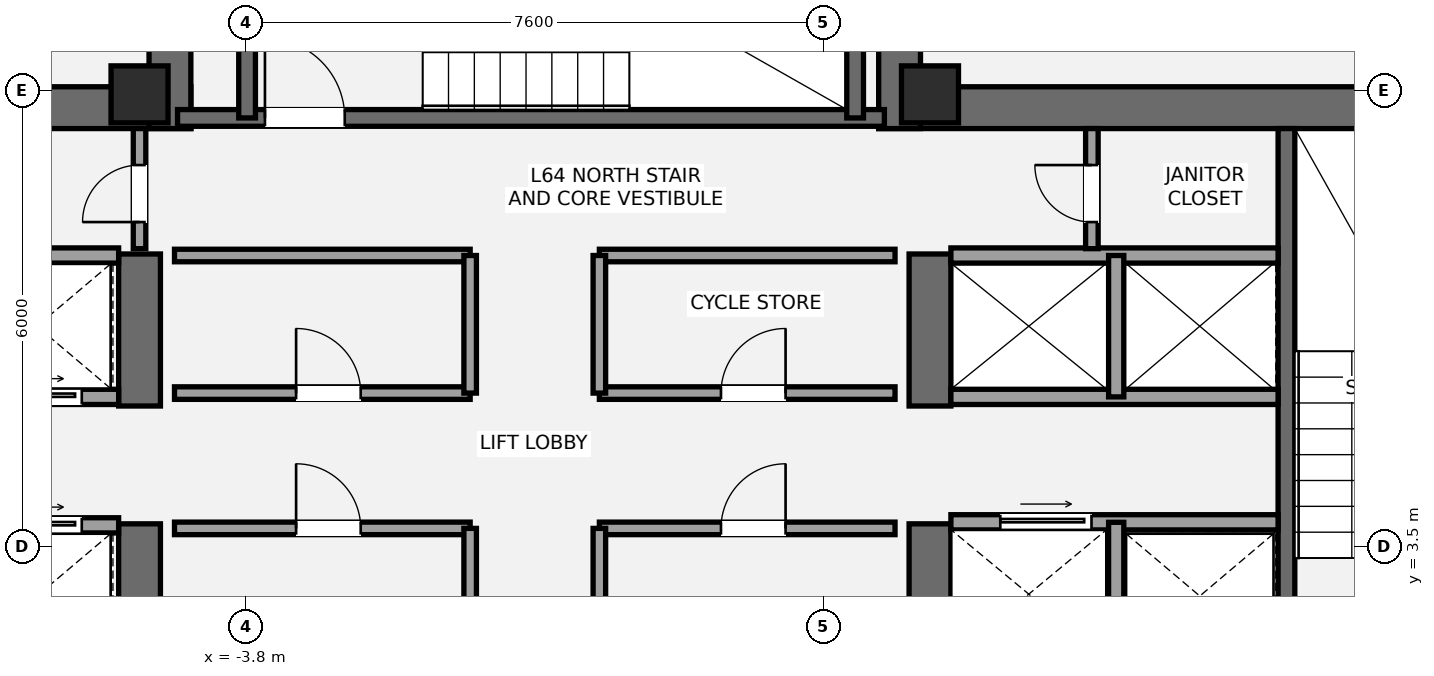
"""IFC4 building model, lengths in metres.
Left out: names, types, materials, properties, quantities, classifications, styles, units other than length and angle.
Written with IfcOpenShell. Run it as: python <this file> out.ifc"""

import sys

from ifc_helpers import new_model, si_unit, direction, frame, frame_2d, origin, origin_2d, place, context, subcontext, project, spatial, rectangle, extrude, element, fill, save


model = new_model("IFC4")
c1 = context("Model", 3, precision=1e-05, world=origin(), true_north=direction((0.0, 1.0)))
c2 = subcontext(c1, "Body", "Model", "MODEL_VIEW")
j1 = project(units=[si_unit("LENGTHUNIT", "METRE"), si_unit("PLANEANGLEUNIT", "RADIAN")], contexts=[c1])
p1 = place(None, origin())
s1 = spatial("IfcSite", under=j1, at=p1, CompositionType="ELEMENT")
p2 = place(p1, origin())
s2 = spatial("IfcBuilding", under=s1, at=p2, CompositionType="ELEMENT")
p3 = place(p2, frame((0.0, 0.0, 228.9)))
s3 = spatial("IfcBuildingStorey", under=s2, at=p3, CompositionType="ELEMENT", Elevation=228.9)
p4 = place(p3, frame((-13.7, 9.275, 0.0), z_axis=(0.0, 0.0, 1.0), x_axis=(1.0, 0.0, 0.0)))
e1 = element("IfcWall", 1, at=p4, inside=s3, PredefinedType="SHEAR", context=c2, shape_type="SweptSolid", body=[
    extrude(rectangle(XDim=9.175, YDim=0.55, at=frame_2d((4.587, 0.0))), origin(), (0.0, 0.0, 1.0), 3.15),
])
p5 = place(p3, frame((-5.2, 1.3, 0.0), z_axis=(0.0, 0.0, 1.0), x_axis=(0.0, 1.0, 0.0)))
e2 = element("IfcWall", 2, at=p5, inside=s3, PredefinedType="SHEAR", context=c2, shape_type="SweptSolid", body=[
    extrude(rectangle(XDim=2.5, YDim=0.55, at=frame_2d((1.25, 0.0))), origin(), (0.0, 0.0, 1.0), 3.15),
])
p6 = place(p3, frame((-5.2, 5.35, 0.0), z_axis=(0.0, 0.0, 1.0), x_axis=(0.0, 1.0, 0.0)))
e3 = element("IfcWall", 3, at=p6, inside=s3, PredefinedType="SHEAR", context=c2, shape_type="SweptSolid", body=[
    extrude(rectangle(XDim=2.0, YDim=0.55, at=frame_2d((1.0, 0.0))), origin(), (0.0, 0.0, 1.0), 3.15),
])
p7 = place(p3, frame((4.525, 9.275, 0.0), z_axis=(0.0, 0.0, 1.0), x_axis=(1.0, 0.0, 0.0)))
e4 = element("IfcWall", 4, at=p7, inside=s3, PredefinedType="SHEAR", context=c2, shape_type="SweptSolid", body=[
    extrude(rectangle(XDim=9.175, YDim=0.55, at=frame_2d((4.587, 0.0))), origin(), (0.0, 0.0, 1.0), 3.15),
])
p8 = place(p3, frame((5.2, 1.3, 0.0), z_axis=(0.0, 0.0, 1.0), x_axis=(0.0, 1.0, 0.0)))
e5 = element("IfcWall", 5, at=p8, inside=s3, PredefinedType="SHEAR", context=c2, shape_type="SweptSolid", body=[
    extrude(rectangle(XDim=2.5, YDim=0.55, at=frame_2d((1.25, 0.0))), origin(), (0.0, 0.0, 1.0), 3.15),
])
p9 = place(p3, frame((5.2, 5.35, 0.0), z_axis=(0.0, 0.0, 1.0), x_axis=(0.0, 1.0, 0.0)))
e6 = element("IfcWall", 6, at=p9, inside=s3, PredefinedType="SHEAR", context=c2, shape_type="SweptSolid", body=[
    extrude(rectangle(XDim=2.0, YDim=0.55, at=frame_2d((1.0, 0.0))), origin(), (0.0, 0.0, 1.0), 3.15),
])
p10 = place(p3, frame((9.89, 1.85, 0.0), z_axis=(0.0, 0.0, 1.0), x_axis=(0.0, 1.0, 0.0)))
e7 = element("IfcWall", 7, at=p10, inside=s3, PredefinedType="SHEAR", context=c2, shape_type="SweptSolid", body=[
    extrude(rectangle(XDim=7.15, YDim=0.22, at=frame_2d((3.575, 0.0))), origin(), (0.0, 0.0, 1.0), 3.15),
])
for number, where, z_axis, x_axis in (
    (8, (-4.8, 9.0, 0.0), (0.0, 0.0, 1.0), (0.0, 1.0, 0.0)),
    (9, (4.8, 9.0, 0.0), (0.0, 0.0, 1.0), (0.0, 1.0, 0.0)),
):
    element("IfcWall", number, at=place(p3, frame(where, z_axis=z_axis, x_axis=x_axis)), inside=s3, PredefinedType="SHEAR", context=c2, shape_type="SweptSolid", body=[
        extrude(rectangle(XDim=3.95, YDim=0.55, at=frame_2d((1.975, 0.0))), origin(), (0.0, 0.0, 1.0), 3.15),
    ])
p11 = place(p3, frame((-4.7, 9.14, 0.0), z_axis=(0.0, 0.0, 1.0), x_axis=(1.0, 0.0, 0.0)))
e10 = element("IfcWall", 10, at=p11, inside=s3, PredefinedType="SHEAR", context=c2, shape_type="SweptSolid", body=[
    extrude(rectangle(XDim=9.3, YDim=0.22, at=frame_2d((4.65, 0.0))), origin(), (0.0, 0.0, 1.0), 3.15),
])
p12 = place(p11, frame((1.15, 0.0, 0.0)))
e11 = element("IfcOpeningElement", 11, at=p12, cuts=e10, PredefinedType="OPENING", context=c2, shape_type="SweptSolid", body=[
    extrude(rectangle(XDim=1.05, YDim=2.15, at=frame_2d((0.525, 1.075))), frame((0.0, 0.12, 0.0), z_axis=(0.0, -1.0, 0.0), x_axis=(1.0, 0.0, 0.0)), (0.0, 0.0, 1.0), 0.24),
])
for number, where, z_axis, x_axis in (
    (12, (-3.785, 9.14, 0.0), (0.0, 0.0, 1.0), (0.0, 1.0, 0.0)),
    (13, (4.215, 9.14, 0.0), (0.0, 0.0, 1.0), (0.0, 1.0, 0.0)),
):
    element("IfcWall", number, at=place(p3, frame(where, z_axis=z_axis, x_axis=x_axis)), inside=s3, PredefinedType="SHEAR", context=c2, shape_type="SweptSolid", body=[
        extrude(rectangle(XDim=3.26, YDim=0.22, at=frame_2d((1.63, 0.0))), origin(), (0.0, 0.0, 1.0), 3.15),
    ])
for number, where, z_axis, x_axis in (
    (14, (-5.2, 9.45, 0.0), (0.0, 0.0, 1.0), (1.0, 0.0, 0.0)),
    (15, (5.2, 9.45, 0.0), (0.0, 0.0, 1.0), (1.0, 0.0, 0.0)),
):
    element("IfcColumn", number, at=place(p3, frame(where, z_axis=z_axis, x_axis=x_axis)), inside=s3, PredefinedType="PILASTER", context=c2, shape_type="SweptSolid", body=[
        extrude(rectangle(XDim=0.75, YDim=0.75, at=origin_2d()), origin(), (0.0, 0.0, 1.0), 3.15),
    ])
p13 = place(p3, frame((-9.78, 3.78, 0.0), z_axis=(0.0, 0.0, 1.0), x_axis=(1.0, 0.0, 0.0)))
e16 = element("IfcWall", 16, at=p13, inside=s3, PredefinedType="SOLIDWALL", context=c2, shape_type="SweptSolid", body=[
    extrude(rectangle(XDim=4.305, YDim=0.2, at=frame_2d((2.152, 0.0))), origin(), (0.0, 0.0, 1.0), 2.97),
])
p14 = place(p13, frame((2.72, 0.0, 0.0)))
e17 = element("IfcOpeningElement", 17, at=p14, cuts=e16, PredefinedType="OPENING", context=c2, shape_type="SweptSolid", body=[
    extrude(rectangle(XDim=1.1, YDim=2.2, at=frame_2d((0.55, 1.1))), frame((0.0, 0.11, 0.0), z_axis=(0.0, -1.0, 0.0), x_axis=(1.0, 0.0, 0.0)), (0.0, 0.0, 1.0), 0.22),
])
p15 = place(p3, frame((-9.78, 5.47, 0.0), z_axis=(0.0, 0.0, 1.0), x_axis=(1.0, 0.0, 0.0)))
e18 = element("IfcWall", 18, at=p15, inside=s3, PredefinedType="SOLIDWALL", context=c2, shape_type="SweptSolid", body=[
    extrude(rectangle(XDim=4.305, YDim=0.2, at=frame_2d((2.152, 0.0))), origin(), (0.0, 0.0, 1.0), 2.97),
])
p16 = place(p15, frame((0.55, 0.0, 0.0)))
e19 = element("IfcOpeningElement", 19, at=p16, cuts=e18, PredefinedType="OPENING", context=c2, shape_type="SweptSolid", body=[
    extrude(rectangle(XDim=1.1, YDim=2.2, at=frame_2d((0.55, 1.1))), frame((0.0, 0.11, 0.0), z_axis=(0.0, -1.0, 0.0), x_axis=(1.0, 0.0, 0.0)), (0.0, 0.0, 1.0), 0.22),
])
p17 = place(p15, frame((2.72, 0.0, 0.0)))
e20 = element("IfcOpeningElement", 20, at=p17, cuts=e18, PredefinedType="OPENING", context=c2, shape_type="SweptSolid", body=[
    extrude(rectangle(XDim=1.1, YDim=2.2, at=frame_2d((0.55, 1.1))), frame((0.0, 0.11, 0.0), z_axis=(0.0, -1.0, 0.0), x_axis=(1.0, 0.0, 0.0)), (0.0, 0.0, 1.0), 0.22),
])
p18 = place(p3, frame((-9.78, 7.33, 0.0), z_axis=(0.0, 0.0, 1.0), x_axis=(1.0, 0.0, 0.0)))
e21 = element("IfcWall", 21, at=p18, inside=s3, PredefinedType="SOLIDWALL", context=c2, shape_type="SweptSolid", body=[
    extrude(rectangle(XDim=4.305, YDim=0.2, at=frame_2d((2.152, 0.0))), origin(), (0.0, 0.0, 1.0), 2.97),
])
p19 = place(p3, frame((5.475, 3.82, 0.0), z_axis=(0.0, 0.0, 1.0), x_axis=(1.0, 0.0, 0.0)))
e22 = element("IfcWall", 22, at=p19, inside=s3, PredefinedType="SOLIDWALL", context=c2, shape_type="SweptSolid", body=[
    extrude(rectangle(XDim=4.305, YDim=0.2, at=frame_2d((2.152, 0.0))), origin(), (0.0, 0.0, 1.0), 2.97),
])
p20 = place(p19, frame((0.65, 0.0, 0.0)))
e23 = element("IfcOpeningElement", 23, at=p20, cuts=e22, PredefinedType="OPENING", context=c2, shape_type="SweptSolid", body=[
    extrude(rectangle(XDim=1.2, YDim=2.2, at=frame_2d((0.6, 1.1))), frame((0.0, 0.11, 0.0), z_axis=(0.0, -1.0, 0.0), x_axis=(1.0, 0.0, 0.0)), (0.0, 0.0, 1.0), 0.22),
])
p21 = place(p3, frame((7.65, 1.85, 0.0), z_axis=(0.0, 0.0, 1.0), x_axis=(0.0, 1.0, 0.0)))
e24 = element("IfcWall", 24, at=p21, inside=s3, PredefinedType="SOLIDWALL", context=c2, shape_type="SweptSolid", body=[
    extrude(rectangle(XDim=1.97, YDim=0.2, at=frame_2d((0.985, 0.0))), origin(), (0.0, 0.0, 1.0), 2.97),
])
for number, where, z_axis, x_axis in (
    (25, (5.475, 5.47, 0.0), (0.0, 0.0, 1.0), (1.0, 0.0, 0.0)),
    (26, (5.475, 7.33, 0.0), (0.0, 0.0, 1.0), (1.0, 0.0, 0.0)),
):
    element("IfcWall", number, at=place(p3, frame(where, z_axis=z_axis, x_axis=x_axis)), inside=s3, PredefinedType="SOLIDWALL", context=c2, shape_type="SweptSolid", body=[
        extrude(rectangle(XDim=4.305, YDim=0.2, at=frame_2d((2.152, 0.0))), origin(), (0.0, 0.0, 1.0), 2.97),
    ])
p22 = place(p3, frame((7.65, 5.47, 0.0), z_axis=(0.0, 0.0, 1.0), x_axis=(0.0, 1.0, 0.0)))
e27 = element("IfcWall", 27, at=p22, inside=s3, PredefinedType="SOLIDWALL", context=c2, shape_type="SweptSolid", body=[
    extrude(rectangle(XDim=1.86, YDim=0.2, at=frame_2d((0.93, 0.0))), origin(), (0.0, 0.0, 1.0), 2.97),
])
p23 = place(p3, frame((-4.74, 3.74, 0.0), z_axis=(0.0, 0.0, 1.0), x_axis=(1.0, 0.0, 0.0)))
e28 = element("IfcWall", 28, at=p23, inside=s3, PredefinedType="PARTITIONING", context=c2, shape_type="SweptSolid", body=[
    extrude(rectangle(XDim=3.89, YDim=0.165, at=frame_2d((1.945, 0.0))), origin(), (0.0, 0.0, 1.0), 2.97),
])
p24 = place(p23, frame((1.6, 0.0, 0.0)))
e29 = element("IfcOpeningElement", 29, at=p24, cuts=e28, PredefinedType="OPENING", context=c2, shape_type="SweptSolid", body=[
    extrude(rectangle(XDim=0.85, YDim=2.1, at=frame_2d((0.425, 1.05))), frame((0.0, 0.093, 0.0), z_axis=(0.0, -1.0, 0.0), x_axis=(1.0, 0.0, 0.0)), (0.0, 0.0, 1.0), 0.185),
])
p25 = place(p3, frame((-0.85, 1.92, 0.0), z_axis=(0.0, 0.0, 1.0), x_axis=(0.0, 1.0, 0.0)))
e30 = element("IfcWall", 30, at=p25, inside=s3, PredefinedType="PARTITIONING", context=c2, shape_type="SweptSolid", body=[
    extrude(rectangle(XDim=1.82, YDim=0.165, at=frame_2d((0.91, 0.0))), origin(), (0.0, 0.0, 1.0), 2.97),
])
p26 = place(p3, frame((0.85, 3.74, 0.0), z_axis=(0.0, 0.0, 1.0), x_axis=(1.0, 0.0, 0.0)))
e31 = element("IfcWall", 31, at=p26, inside=s3, PredefinedType="PARTITIONING", context=c2, shape_type="SweptSolid", body=[
    extrude(rectangle(XDim=3.89, YDim=0.165, at=frame_2d((1.945, 0.0))), origin(), (0.0, 0.0, 1.0), 2.97),
])
p27 = place(p26, frame((1.6, 0.0, 0.0)))
e32 = element("IfcOpeningElement", 32, at=p27, cuts=e31, PredefinedType="OPENING", context=c2, shape_type="SweptSolid", body=[
    extrude(rectangle(XDim=0.85, YDim=2.1, at=frame_2d((0.425, 1.05))), frame((0.0, 0.093, 0.0), z_axis=(0.0, -1.0, 0.0), x_axis=(1.0, 0.0, 0.0)), (0.0, 0.0, 1.0), 0.185),
])
p28 = place(p3, frame((0.85, 1.92, 0.0), z_axis=(0.0, 0.0, 1.0), x_axis=(0.0, 1.0, 0.0)))
e33 = element("IfcWall", 33, at=p28, inside=s3, PredefinedType="PARTITIONING", context=c2, shape_type="SweptSolid", body=[
    extrude(rectangle(XDim=1.82, YDim=0.165, at=frame_2d((0.91, 0.0))), origin(), (0.0, 0.0, 1.0), 2.97),
])
p29 = place(p3, frame((-4.74, 5.52, 0.0), z_axis=(0.0, 0.0, 1.0), x_axis=(1.0, 0.0, 0.0)))
e34 = element("IfcWall", 34, at=p29, inside=s3, PredefinedType="PARTITIONING", context=c2, shape_type="SweptSolid", body=[
    extrude(rectangle(XDim=3.89, YDim=0.165, at=frame_2d((1.945, 0.0))), origin(), (0.0, 0.0, 1.0), 2.97),
])
p30 = place(p29, frame((1.6, 0.0, 0.0)))
e35 = element("IfcOpeningElement", 35, at=p30, cuts=e34, PredefinedType="OPENING", context=c2, shape_type="SweptSolid", body=[
    extrude(rectangle(XDim=0.85, YDim=2.1, at=frame_2d((0.425, 1.05))), frame((0.0, 0.093, 0.0), z_axis=(0.0, -1.0, 0.0), x_axis=(1.0, 0.0, 0.0)), (0.0, 0.0, 1.0), 0.185),
])
p31 = place(p3, frame((-4.74, 7.33, 0.0), z_axis=(0.0, 0.0, 1.0), x_axis=(1.0, 0.0, 0.0)))
e36 = element("IfcWall", 36, at=p31, inside=s3, PredefinedType="PARTITIONING", context=c2, shape_type="SweptSolid", body=[
    extrude(rectangle(XDim=3.89, YDim=0.165, at=frame_2d((1.945, 0.0))), origin(), (0.0, 0.0, 1.0), 2.97),
])
p32 = place(p3, frame((-0.85, 5.52, 0.0), z_axis=(0.0, 0.0, 1.0), x_axis=(0.0, 1.0, 0.0)))
e37 = element("IfcWall", 37, at=p32, inside=s3, PredefinedType="PARTITIONING", context=c2, shape_type="SweptSolid", body=[
    extrude(rectangle(XDim=1.81, YDim=0.165, at=frame_2d((0.905, 0.0))), origin(), (0.0, 0.0, 1.0), 2.97),
])
p33 = place(p3, frame((0.85, 5.52, 0.0), z_axis=(0.0, 0.0, 1.0), x_axis=(1.0, 0.0, 0.0)))
e38 = element("IfcWall", 38, at=p33, inside=s3, PredefinedType="PARTITIONING", context=c2, shape_type="SweptSolid", body=[
    extrude(rectangle(XDim=3.89, YDim=0.165, at=frame_2d((1.945, 0.0))), origin(), (0.0, 0.0, 1.0), 2.97),
])
p34 = place(p33, frame((1.6, 0.0, 0.0)))
e39 = element("IfcOpeningElement", 39, at=p34, cuts=e38, PredefinedType="OPENING", context=c2, shape_type="SweptSolid", body=[
    extrude(rectangle(XDim=0.85, YDim=2.1, at=frame_2d((0.425, 1.05))), frame((0.0, 0.093, 0.0), z_axis=(0.0, -1.0, 0.0), x_axis=(1.0, 0.0, 0.0)), (0.0, 0.0, 1.0), 0.185),
])
p35 = place(p3, frame((0.85, 7.33, 0.0), z_axis=(0.0, 0.0, 1.0), x_axis=(1.0, 0.0, 0.0)))
e40 = element("IfcWall", 40, at=p35, inside=s3, PredefinedType="PARTITIONING", context=c2, shape_type="SweptSolid", body=[
    extrude(rectangle(XDim=3.89, YDim=0.165, at=frame_2d((1.945, 0.0))), origin(), (0.0, 0.0, 1.0), 2.97),
])
p36 = place(p3, frame((0.85, 5.52, 0.0), z_axis=(0.0, 0.0, 1.0), x_axis=(0.0, 1.0, 0.0)))
e41 = element("IfcWall", 41, at=p36, inside=s3, PredefinedType="PARTITIONING", context=c2, shape_type="SweptSolid", body=[
    extrude(rectangle(XDim=1.81, YDim=0.165, at=frame_2d((0.905, 0.0))), origin(), (0.0, 0.0, 1.0), 2.97),
])
p37 = place(p3, frame((-5.2, 7.42, 0.0), z_axis=(0.0, 0.0, 1.0), x_axis=(0.0, 1.0, 0.0)))
e42 = element("IfcWall", 42, at=p37, inside=s3, PredefinedType="PARTITIONING", context=c2, shape_type="SweptSolid", body=[
    extrude(rectangle(XDim=1.58, YDim=0.165, at=frame_2d((0.79, 0.0))), origin(), (0.0, 0.0, 1.0), 2.97),
])
p38 = place(p37, frame((0.35, 0.0, 0.0)))
e43 = element("IfcOpeningElement", 43, at=p38, cuts=e42, PredefinedType="OPENING", context=c2, shape_type="SweptSolid", body=[
    extrude(rectangle(XDim=0.75, YDim=2.1, at=frame_2d((0.375, 1.05))), frame((0.0, 0.093, 0.0), z_axis=(0.0, -1.0, 0.0), x_axis=(1.0, 0.0, 0.0)), (0.0, 0.0, 1.0), 0.185),
])
p39 = place(p3, frame((7.33, 7.42, 0.0), z_axis=(0.0, 0.0, 1.0), x_axis=(0.0, 1.0, 0.0)))
e44 = element("IfcWall", 44, at=p39, inside=s3, PredefinedType="PARTITIONING", context=c2, shape_type="SweptSolid", body=[
    extrude(rectangle(XDim=1.58, YDim=0.165, at=frame_2d((0.79, 0.0))), origin(), (0.0, 0.0, 1.0), 2.97),
])
p40 = place(p39, frame((0.35, 0.0, 0.0)))
e45 = element("IfcOpeningElement", 45, at=p40, cuts=e44, PredefinedType="OPENING", context=c2, shape_type="SweptSolid", body=[
    extrude(rectangle(XDim=0.75, YDim=2.1, at=frame_2d((0.375, 1.05))), frame((0.0, 0.093, 0.0), z_axis=(0.0, -1.0, 0.0), x_axis=(1.0, 0.0, 0.0)), (0.0, 0.0, 1.0), 0.185),
])
p41 = place(p12, origin())
e46 = element("IfcDoor", 46, at=p41, inside=s3, OperationType="SINGLE_SWING_LEFT", PredefinedType="DOOR", context=c2, shape_type="SweptSolid", body=[
    extrude(rectangle(XDim=1.05, YDim=2.15, at=frame_2d((0.525, 1.075))), frame((0.0, 0.025, 0.0), z_axis=(0.0, -1.0, 0.0), x_axis=(1.0, 0.0, 0.0)), (0.0, 0.0, 1.0), 0.05),
])
fill(e11, e46)
p42 = place(p17, origin())
e47 = element("IfcDoor", 47, at=p42, inside=s3, OperationType="SLIDING_TO_LEFT", PredefinedType="DOOR", context=c2, shape_type="SweptSolid", body=[
    extrude(rectangle(XDim=1.1, YDim=2.2, at=frame_2d((0.55, 1.1))), frame((0.0, 0.025, 0.0), z_axis=(0.0, -1.0, 0.0), x_axis=(1.0, 0.0, 0.0)), (0.0, 0.0, 1.0), 0.05),
])
fill(e20, e47)
p43 = place(p14, origin())
e48 = element("IfcDoor", 48, at=p43, inside=s3, OperationType="SLIDING_TO_LEFT", PredefinedType="DOOR", context=c2, shape_type="SweptSolid", body=[
    extrude(rectangle(XDim=1.1, YDim=2.2, at=frame_2d((0.55, 1.1))), frame((0.0, 0.025, 0.0), z_axis=(0.0, -1.0, 0.0), x_axis=(1.0, 0.0, 0.0)), (0.0, 0.0, 1.0), 0.05),
])
fill(e17, e48)
p44 = place(p20, origin())
e49 = element("IfcDoor", 49, at=p44, inside=s3, OperationType="SLIDING_TO_RIGHT", PredefinedType="DOOR", context=c2, shape_type="SweptSolid", body=[
    extrude(rectangle(XDim=1.2, YDim=2.2, at=frame_2d((0.6, 1.1))), frame((0.0, 0.025, 0.0), z_axis=(0.0, -1.0, 0.0), x_axis=(1.0, 0.0, 0.0)), (0.0, 0.0, 1.0), 0.05),
])
fill(e23, e49)
p45 = place(p24, origin())
e50 = element("IfcDoor", 50, at=p45, inside=s3, OperationType="SINGLE_SWING_LEFT", PredefinedType="DOOR", context=c2, shape_type="SweptSolid", body=[
    extrude(rectangle(XDim=0.85, YDim=2.1, at=frame_2d((0.425, 1.05))), frame((0.0, 0.025, 0.0), z_axis=(0.0, -1.0, 0.0), x_axis=(1.0, 0.0, 0.0)), (0.0, 0.0, 1.0), 0.05),
])
fill(e29, e50)
p46 = place(p27, origin())
e51 = element("IfcDoor", 51, at=p46, inside=s3, OperationType="SINGLE_SWING_RIGHT", PredefinedType="DOOR", context=c2, shape_type="SweptSolid", body=[
    extrude(rectangle(XDim=0.85, YDim=2.1, at=frame_2d((0.425, 1.05))), frame((0.0, 0.025, 0.0), z_axis=(0.0, -1.0, 0.0), x_axis=(1.0, 0.0, 0.0)), (0.0, 0.0, 1.0), 0.05),
])
fill(e32, e51)
p47 = place(p30, origin())
e52 = element("IfcDoor", 52, at=p47, inside=s3, OperationType="SINGLE_SWING_LEFT", PredefinedType="DOOR", context=c2, shape_type="SweptSolid", body=[
    extrude(rectangle(XDim=0.85, YDim=2.1, at=frame_2d((0.425, 1.05))), frame((0.0, 0.025, 0.0), z_axis=(0.0, -1.0, 0.0), x_axis=(1.0, 0.0, 0.0)), (0.0, 0.0, 1.0), 0.05),
])
fill(e35, e52)
p48 = place(p34, origin())
e53 = element("IfcDoor", 53, at=p48, inside=s3, OperationType="SINGLE_SWING_RIGHT", PredefinedType="DOOR", context=c2, shape_type="SweptSolid", body=[
    extrude(rectangle(XDim=0.85, YDim=2.1, at=frame_2d((0.425, 1.05))), frame((0.0, 0.025, 0.0), z_axis=(0.0, -1.0, 0.0), x_axis=(1.0, 0.0, 0.0)), (0.0, 0.0, 1.0), 0.05),
])
fill(e39, e53)
p49 = place(p38, origin())
e54 = element("IfcDoor", 54, at=p49, inside=s3, OperationType="SINGLE_SWING_LEFT", PredefinedType="DOOR", context=c2, shape_type="SweptSolid", body=[
    extrude(rectangle(XDim=0.75, YDim=2.1, at=frame_2d((0.375, 1.05))), frame((0.0, 0.025, 0.0), z_axis=(0.0, -1.0, 0.0), x_axis=(1.0, 0.0, 0.0)), (0.0, 0.0, 1.0), 0.05),
])
fill(e43, e54)
p50 = place(p40, origin())
e55 = element("IfcDoor", 55, at=p50, inside=s3, OperationType="SINGLE_SWING_RIGHT", PredefinedType="DOOR", context=c2, shape_type="SweptSolid", body=[
    extrude(rectangle(XDim=0.75, YDim=2.1, at=frame_2d((0.375, 1.05))), frame((0.0, 0.025, 0.0), z_axis=(0.0, -1.0, 0.0), x_axis=(1.0, 0.0, 0.0)), (0.0, 0.0, 1.0), 0.05),
])
fill(e45, e55)
save(model, sys.argv[1])
